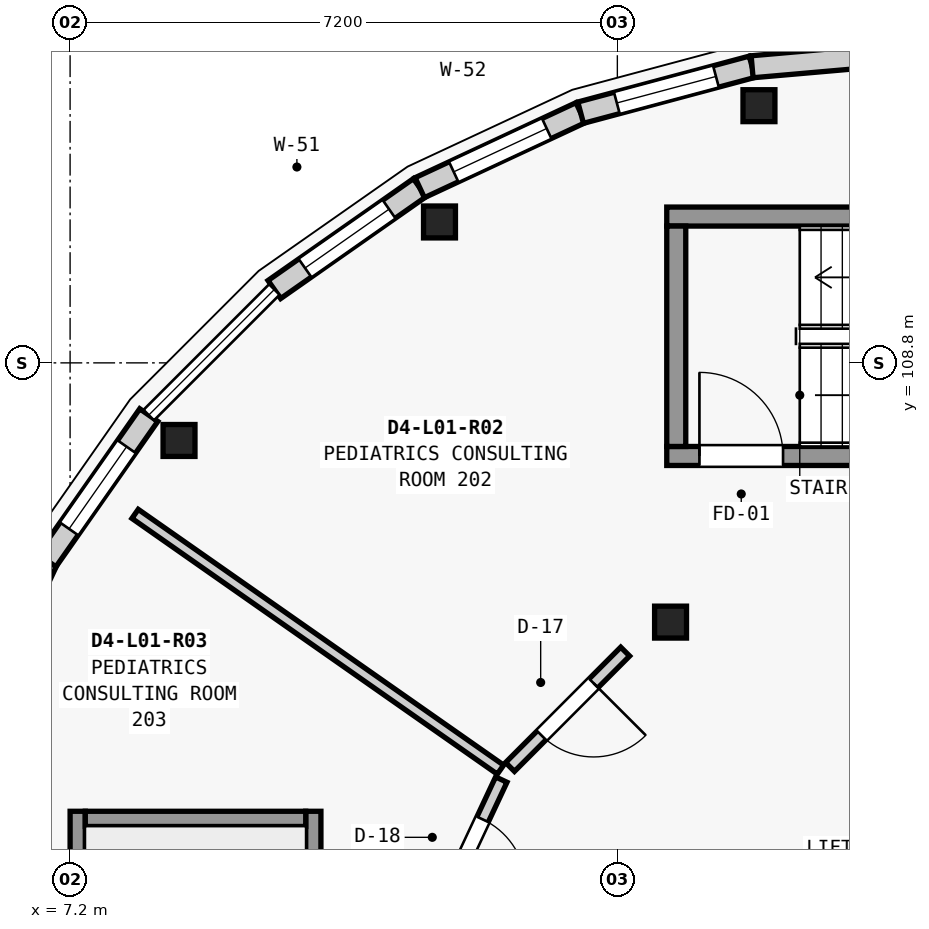
"""IFC4 building model, lengths in metres.
Left out: names, types, materials, properties, quantities, classifications, styles, units other than length and angle.
Written with IfcOpenShell. Run it as: python <this file> out.ifc"""

import sys

from ifc_helpers import new_model, si_unit, direction, frame, frame_2d, origin, origin_2d, place, context, subcontext, project, spatial, rectangle, extrude, element, fill, save


model = new_model("IFC4")
c1 = context("Model", 3, precision=1e-05, world=origin(), true_north=direction((0.0, 1.0)))
c2 = subcontext(c1, "Body", "Model", "MODEL_VIEW")
j1 = project(units=[si_unit("LENGTHUNIT", "METRE"), si_unit("PLANEANGLEUNIT", "RADIAN")], contexts=[c1])
p1 = place(None, origin())
s1 = spatial("IfcSite", under=j1, at=p1, CompositionType="ELEMENT")
p2 = place(p1, origin())
s2 = spatial("IfcBuilding", under=s1, at=p2, CompositionType="ELEMENT")
p3 = place(p2, frame((0.0, 0.0, 4.55)))
s3 = spatial("IfcBuildingStorey", under=s2, at=p3, CompositionType="ELEMENT", Elevation=4.55)
for number, where, z_axis, x_axis in (
    (1, (16.263, 112.184, 0.0), (0.0, 0.0, 1.0), (1.0, 0.0, 0.0)),
    (2, (12.06, 110.654, 0.0), (0.0, 0.0, 1.0), (1.0, 0.0, 0.0)),
    (3, (8.633, 107.779, 0.0), (0.0, 0.0, 1.0), (1.0, 0.0, 0.0)),
    (4, (15.1, 105.389, 0.0), (0.0, 0.0, 1.0), (1.0, 0.0, 0.0)),
):
    element("IfcColumn", number, at=place(p3, frame(where, z_axis=z_axis, x_axis=x_axis)), inside=s3, PredefinedType="COLUMN", context=c2, shape_type="SweptSolid", body=[
        extrude(rectangle(XDim=0.42, YDim=0.42, at=origin_2d()), origin(), (0.0, 0.0, 1.0), 4.2),
    ])
p4 = place(p3, frame((5.908, 104.083, 0.0), z_axis=(0.0, 0.0, 1.0), x_axis=(0.422587894318, 0.906321946979, 0.0)))
e5 = element("IfcWall", 5, at=p4, inside=s3, PredefinedType="ELEMENTEDWALL", context=c2, shape_type="SweptSolid", body=[
    extrude(rectangle(XDim=2.336, YDim=0.29, at=frame_2d((1.168, 0.0))), origin(), (0.0, 0.0, 1.0), 3.309),
])
p5 = place(p4, frame((0.518, 0.0, 0.7)))
e6 = element("IfcOpeningElement", 6, at=p5, cuts=e5, PredefinedType="OPENING", context=c2, shape_type="SweptSolid", body=[
    extrude(rectangle(XDim=1.3, YDim=2.3, at=frame_2d((0.65, 1.15))), frame((0.0, 0.155, 0.0), z_axis=(0.0, -1.0, 0.0), x_axis=(1.0, 0.0, 0.0)), (0.0, 0.0, 1.0), 0.31),
])
p6 = place(p3, frame((6.895, 106.2, 0.0), z_axis=(0.0, 0.0, 1.0), x_axis=(0.573728883722, 0.819045278347, 0.0)))
e7 = element("IfcWall", 7, at=p6, inside=s3, PredefinedType="ELEMENTEDWALL", context=c2, shape_type="SweptSolid", body=[
    extrude(rectangle(XDim=2.336, YDim=0.29, at=frame_2d((1.168, 0.0))), origin(), (0.0, 0.0, 1.0), 3.309),
])
p7 = place(p6, frame((0.508, 0.0, 0.85)))
e8 = element("IfcOpeningElement", 8, at=p7, cuts=e7, PredefinedType="OPENING", context=c2, shape_type="SweptSolid", body=[
    extrude(rectangle(XDim=1.32, YDim=1.55, at=frame_2d((0.66, 0.775))), frame((0.0, 0.155, 0.0), z_axis=(0.0, -1.0, 0.0), x_axis=(1.0, 0.0, 0.0)), (0.0, 0.0, 1.0), 0.31),
])
p8 = place(p3, frame((9.887, 109.765, 0.0), z_axis=(0.0, 0.0, 1.0), x_axis=(0.819045278347, 0.573728883722, 0.0)))
e9 = element("IfcWall", 9, at=p8, inside=s3, PredefinedType="ELEMENTEDWALL", context=c2, shape_type="SweptSolid", body=[
    extrude(rectangle(XDim=2.336, YDim=0.29, at=frame_2d((1.168, 0.0))), origin(), (0.0, 0.0, 1.0), 3.309),
])
p9 = place(p8, frame((0.493, 0.0, 0.85)))
e10 = element("IfcOpeningElement", 10, at=p9, cuts=e9, PredefinedType="OPENING", context=c2, shape_type="SweptSolid", body=[
    extrude(rectangle(XDim=1.35, YDim=1.55, at=frame_2d((0.675, 0.775))), frame((0.0, 0.155, 0.0), z_axis=(0.0, -1.0, 0.0), x_axis=(1.0, 0.0, 0.0)), (0.0, 0.0, 1.0), 0.31),
])
p10 = place(p3, frame((11.8, 111.105, 0.0), z_axis=(0.0, 0.0, 1.0), x_axis=(0.906321946979, 0.422587894318, 0.0)))
e11 = element("IfcWall", 11, at=p10, inside=s3, PredefinedType="ELEMENTEDWALL", context=c2, shape_type="SweptSolid", body=[
    extrude(rectangle(XDim=2.336, YDim=0.29, at=frame_2d((1.168, 0.0))), origin(), (0.0, 0.0, 1.0), 3.309),
])
p11 = place(p10, frame((0.493, 0.0, 0.85)))
e12 = element("IfcOpeningElement", 12, at=p11, cuts=e11, PredefinedType="OPENING", context=c2, shape_type="SweptSolid", body=[
    extrude(rectangle(XDim=1.35, YDim=1.85, at=frame_2d((0.675, 0.925))), frame((0.0, 0.155, 0.0), z_axis=(0.0, -1.0, 0.0), x_axis=(1.0, 0.0, 0.0)), (0.0, 0.0, 1.0), 0.31),
])
p12 = place(p3, frame((13.917, 112.092, 0.0), z_axis=(0.0, 0.0, 1.0), x_axis=(0.965981166673, 0.258612423585, 0.0)))
e13 = element("IfcWall", 13, at=p12, inside=s3, PredefinedType="ELEMENTEDWALL", context=c2, shape_type="SweptSolid", body=[
    extrude(rectangle(XDim=2.335, YDim=0.29, at=frame_2d((1.168, 0.0))), origin(), (0.0, 0.0, 1.0), 3.309),
])
p13 = place(p12, frame((0.493, 0.0, 0.85)))
e14 = element("IfcOpeningElement", 14, at=p13, cuts=e13, PredefinedType="OPENING", context=c2, shape_type="SweptSolid", body=[
    extrude(rectangle(XDim=1.35, YDim=2.15, at=frame_2d((0.675, 1.075))), frame((0.0, 0.155, 0.0), z_axis=(0.0, -1.0, 0.0), x_axis=(1.0, 0.0, 0.0)), (0.0, 0.0, 1.0), 0.31),
])
p14 = place(p3, frame((16.173, 112.696, 0.0), z_axis=(0.0, 0.0, 1.0), x_axis=(0.996184295282, 0.087274565792, 0.0)))
e15 = element("IfcWall", 15, at=p14, inside=s3, PredefinedType="ELEMENTEDWALL", context=c2, shape_type="SweptSolid", body=[
    extrude(rectangle(XDim=2.336, YDim=0.29, at=frame_2d((1.168, 0.0))), origin(), (0.0, 0.0, 1.0), 3.309),
])
p15 = place(p3, frame((15.05, 107.575, 0.0), z_axis=(0.0, 0.0, 1.0), x_axis=(1.0, 0.0, 0.0)))
e16 = element("IfcWall", 16, at=p15, inside=s3, PredefinedType="SHEAR", context=c2, shape_type="SweptSolid", body=[
    extrude(rectangle(XDim=6.9, YDim=0.25, at=frame_2d((3.45, 0.0))), origin(), (0.0, 0.0, 1.0), 3.955),
])
p16 = place(p15, frame((0.43, 0.0, 0.0)))
e17 = element("IfcOpeningElement", 17, at=p16, cuts=e16, PredefinedType="OPENING", context=c2, shape_type="SweptSolid", body=[
    extrude(rectangle(XDim=1.1, YDim=2.15, at=frame_2d((0.55, 1.075))), frame((0.0, 0.135, 0.0), z_axis=(0.0, -1.0, 0.0), x_axis=(1.0, 0.0, 0.0)), (0.0, 0.0, 1.0), 0.27),
])
p17 = place(p3, frame((15.05, 110.725, 0.0), z_axis=(0.0, 0.0, 1.0), x_axis=(1.0, 0.0, 0.0)))
e18 = element("IfcWall", 18, at=p17, inside=s3, PredefinedType="SHEAR", context=c2, shape_type="SweptSolid", body=[
    extrude(rectangle(XDim=6.9, YDim=0.25, at=frame_2d((3.45, 0.0))), origin(), (0.0, 0.0, 1.0), 3.955),
])
p18 = place(p3, frame((15.175, 107.7, 0.0), z_axis=(0.0, 0.0, 1.0), x_axis=(0.0, 1.0, 0.0)))
e19 = element("IfcWall", 19, at=p18, inside=s3, PredefinedType="SHEAR", context=c2, shape_type="SweptSolid", body=[
    extrude(rectangle(XDim=2.9, YDim=0.25, at=frame_2d((1.45, 0.0))), origin(), (0.0, 0.0, 1.0), 3.955),
])
p19 = place(p3, frame((10.4, 96.1, 0.0), z_axis=(0.0, 0.0, 1.0), x_axis=(0.0, 1.0, 0.0)))
e20 = element("IfcWall", 20, at=p19, inside=s3, PredefinedType="SHEAR", context=c2, shape_type="SweptSolid", body=[
    extrude(rectangle(XDim=6.8, YDim=0.2, at=frame_2d((3.4, 0.0))), origin(), (0.0, 0.0, 1.0), 3.955),
])
p20 = place(p19, frame((0.38, 0.0, 0.0)))
e21 = element("IfcOpeningElement", 21, at=p20, cuts=e20, PredefinedType="OPENING", context=c2, shape_type="SweptSolid", body=[
    extrude(rectangle(XDim=1.05, YDim=2.15, at=frame_2d((0.525, 1.075))), frame((0.0, 0.11, 0.0), z_axis=(0.0, -1.0, 0.0), x_axis=(1.0, 0.0, 0.0)), (0.0, 0.0, 1.0), 0.22),
])
p21 = place(p3, frame((7.3, 96.1, 0.0), z_axis=(0.0, 0.0, 1.0), x_axis=(0.0, 1.0, 0.0)))
e22 = element("IfcWall", 22, at=p21, inside=s3, PredefinedType="SHEAR", context=c2, shape_type="SweptSolid", body=[
    extrude(rectangle(XDim=6.8, YDim=0.2, at=frame_2d((3.4, 0.0))), origin(), (0.0, 0.0, 1.0), 3.955),
])
p22 = place(p3, frame((10.3, 102.8, 0.0), z_axis=(0.0, 0.0, 1.0), x_axis=(-1.0, 0.0, 0.0)))
e23 = element("IfcWall", 23, at=p22, inside=s3, PredefinedType="SHEAR", context=c2, shape_type="SweptSolid", body=[
    extrude(rectangle(XDim=2.9, YDim=0.2, at=frame_2d((1.45, 0.0))), origin(), (0.0, 0.0, 1.0), 3.955),
])
p23 = place(p3, frame((12.862, 103.448, 0.0), z_axis=(0.0, 0.0, 1.0), x_axis=(-0.819231920519, 0.573462344363, 0.0)))
e24 = element("IfcWall", 24, at=p23, inside=s3, PredefinedType="PARTITIONING", context=c2, shape_type="SweptSolid", body=[
    extrude(rectangle(XDim=5.868, YDim=0.145, at=frame_2d((2.934, 0.0))), origin(), (0.0, 0.0, 1.0), 3.284),
])
p24 = place(p3, frame((14.503, 105.001, 0.0), z_axis=(0.0, 0.0, 1.0), x_axis=(-0.706366445294, -0.707846342762, 0.0)))
e25 = element("IfcWall", 25, at=p24, inside=s3, PredefinedType="PARTITIONING", context=c2, shape_type="SweptSolid", body=[
    extrude(rectangle(XDim=2.145, YDim=0.165, at=frame_2d((1.072, 0.0))), origin(), (0.0, 0.0, 1.0), 3.284),
])
p25 = place(p24, frame((0.588, 0.0, 0.0)))
e26 = element("IfcOpeningElement", 26, at=p25, cuts=e25, PredefinedType="OPENING", context=c2, shape_type="SweptSolid", body=[
    extrude(rectangle(XDim=0.97, YDim=2.2, at=frame_2d((0.485, 1.1))), frame((0.0, 0.093, 0.0), z_axis=(0.0, -1.0, 0.0), x_axis=(1.0, 0.0, 0.0)), (0.0, 0.0, 1.0), 0.185),
])
p26 = place(p3, frame((12.873, 103.317, 0.0), z_axis=(0.0, 0.0, 1.0), x_axis=(-0.424218123239, -0.905560038824, 0.0)))
e27 = element("IfcWall", 27, at=p26, inside=s3, PredefinedType="PARTITIONING", context=c2, shape_type="SweptSolid", body=[
    extrude(rectangle(XDim=2.146, YDim=0.165, at=frame_2d((1.073, 0.0))), origin(), (0.0, 0.0, 1.0), 3.284),
])
p27 = place(p26, frame((0.578, 0.0, 0.0)))
e28 = element("IfcOpeningElement", 28, at=p27, cuts=e27, PredefinedType="OPENING", context=c2, shape_type="SweptSolid", body=[
    extrude(rectangle(XDim=0.99, YDim=2.22, at=frame_2d((0.495, 1.11))), frame((0.0, 0.093, 0.0), z_axis=(0.0, -1.0, 0.0), x_axis=(1.0, 0.0, 0.0)), (0.0, 0.0, 1.0), 0.185),
])
p28 = place(p7, origin())
e29 = element("IfcWindow", 29, at=p28, inside=s3, PartitioningType="SINGLE_PANEL", PredefinedType="WINDOW", context=c2, shape_type="SweptSolid", body=[
    extrude(rectangle(XDim=1.32, YDim=1.55, at=frame_2d((0.66, 0.775))), frame((0.0, 0.03, 0.0), z_axis=(0.0, -1.0, 0.0), x_axis=(1.0, 0.0, 0.0)), (0.0, 0.0, 1.0), 0.06),
])
fill(e8, e29)
p29 = place(p9, origin())
e30 = element("IfcWindow", 30, at=p29, inside=s3, PartitioningType="SINGLE_PANEL", PredefinedType="WINDOW", context=c2, shape_type="SweptSolid", body=[
    extrude(rectangle(XDim=1.35, YDim=1.55, at=frame_2d((0.675, 0.775))), frame((0.0, 0.03, 0.0), z_axis=(0.0, -1.0, 0.0), x_axis=(1.0, 0.0, 0.0)), (0.0, 0.0, 1.0), 0.06),
])
fill(e10, e30)
p30 = place(p11, origin())
e31 = element("IfcWindow", 31, at=p30, inside=s3, PartitioningType="SINGLE_PANEL", PredefinedType="WINDOW", context=c2, shape_type="SweptSolid", body=[
    extrude(rectangle(XDim=1.35, YDim=1.85, at=frame_2d((0.675, 0.925))), frame((0.0, 0.03, 0.0), z_axis=(0.0, -1.0, 0.0), x_axis=(1.0, 0.0, 0.0)), (0.0, 0.0, 1.0), 0.06),
])
fill(e12, e31)
p31 = place(p13, origin())
e32 = element("IfcWindow", 32, at=p31, inside=s3, PartitioningType="SINGLE_PANEL", PredefinedType="WINDOW", context=c2, shape_type="SweptSolid", body=[
    extrude(rectangle(XDim=1.35, YDim=2.15, at=frame_2d((0.675, 1.075))), frame((0.0, 0.03, 0.0), z_axis=(0.0, -1.0, 0.0), x_axis=(1.0, 0.0, 0.0)), (0.0, 0.0, 1.0), 0.06),
])
fill(e14, e32)
p32 = place(p16, origin())
e33 = element("IfcDoor", 33, at=p32, inside=s3, OperationType="SINGLE_SWING_LEFT", PredefinedType="DOOR", context=c2, shape_type="SweptSolid", body=[
    extrude(rectangle(XDim=1.1, YDim=2.15, at=frame_2d((0.55, 1.075))), frame((0.0, 0.025, 0.0), z_axis=(0.0, -1.0, 0.0), x_axis=(1.0, 0.0, 0.0)), (0.0, 0.0, 1.0), 0.05),
])
fill(e17, e33)
p33 = place(p25, origin())
e34 = element("IfcDoor", 34, at=p33, inside=s3, OperationType="SINGLE_SWING_LEFT", PredefinedType="DOOR", context=c2, shape_type="SweptSolid", body=[
    extrude(rectangle(XDim=0.97, YDim=2.2, at=frame_2d((0.485, 1.1))), frame((0.0, 0.025, 0.0), z_axis=(0.0, -1.0, 0.0), x_axis=(1.0, 0.0, 0.0)), (0.0, 0.0, 1.0), 0.05),
])
fill(e26, e34)
p34 = place(p27, origin())
e35 = element("IfcDoor", 35, at=p34, inside=s3, OperationType="SINGLE_SWING_RIGHT", PredefinedType="DOOR", context=c2, shape_type="SweptSolid", body=[
    extrude(rectangle(XDim=0.99, YDim=2.22, at=frame_2d((0.495, 1.11))), frame((0.0, 0.025, 0.0), z_axis=(0.0, -1.0, 0.0), x_axis=(1.0, 0.0, 0.0)), (0.0, 0.0, 1.0), 0.05),
])
fill(e28, e35)
save(model, sys.argv[1])
